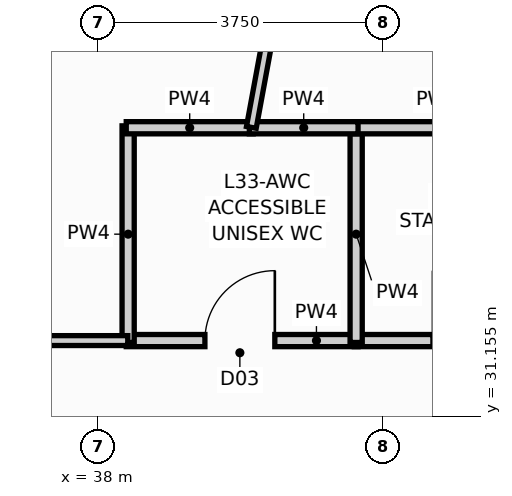
"""IFC4 building model, lengths in metres.
Left out: names, types, materials, properties, quantities, classifications, styles, units other than length and angle.
Written with IfcOpenShell. Run it as: python <this file> out.ifc"""

import sys

from ifc_helpers import new_model, si_unit, direction, frame, frame_2d, origin, place, context, subcontext, project, spatial, rectangle, extrude, element, fill, save


model = new_model("IFC4")
c1 = context("Model", 3, precision=1e-05, world=origin(), true_north=direction((0.0, 1.0)))
c2 = subcontext(c1, "Body", "Model", "MODEL_VIEW")
j1 = project(units=[si_unit("LENGTHUNIT", "METRE"), si_unit("PLANEANGLEUNIT", "RADIAN")], contexts=[c1])
p1 = place(None, origin())
s1 = spatial("IfcSite", under=j1, at=p1, CompositionType="ELEMENT")
p2 = place(p1, origin())
s2 = spatial("IfcBuilding", under=s1, at=p2, CompositionType="ELEMENT")
p3 = place(p2, frame((0.0, 0.0, 127.3)))
s3 = spatial("IfcBuildingStorey", under=s2, at=p3, CompositionType="ELEMENT", Elevation=127.3)
p4 = place(p3, frame((38.375, 32.15, 0.0), z_axis=(0.0, 0.0, 1.0), x_axis=(1.0, 0.0, 0.0)))
e1 = element("IfcWall", 1, at=p4, inside=s3, PredefinedType="PLUMBINGWALL", context=c2, shape_type="SweptSolid", body=[
    extrude(rectangle(XDim=3.05, YDim=0.16, at=frame_2d((1.525, 0.0))), origin(), (0.0, 0.0, 1.0), 3.928),
])
p5 = place(p4, frame((1.035, 0.0, 0.0)))
e2 = element("IfcOpeningElement", 2, at=p5, cuts=e1, PredefinedType="OPENING", context=c2, shape_type="SweptSolid", body=[
    extrude(rectangle(XDim=0.92, YDim=2.1, at=frame_2d((0.46, 1.05))), frame((0.0, 0.092, 0.0), z_axis=(0.0, -1.0, 0.0), x_axis=(1.0, 0.0, 0.0)), (0.0, 0.0, 1.0), 0.184),
])
p6 = place(p3, frame((41.375, 32.15, 0.0), z_axis=(0.0, 0.0, 1.0), x_axis=(1.0, 0.0, 0.0)))
e3 = element("IfcWall", 3, at=p6, inside=s3, PredefinedType="PLUMBINGWALL", context=c2, shape_type="SweptSolid", body=[
    extrude(rectangle(XDim=3.05, YDim=0.16, at=frame_2d((1.525, 0.0))), origin(), (0.0, 0.0, 1.0), 3.928),
])
p7 = place(p6, frame((1.035, 0.0, 0.0)))
e4 = element("IfcOpeningElement", 4, at=p7, cuts=e3, PredefinedType="OPENING", context=c2, shape_type="SweptSolid", body=[
    extrude(rectangle(XDim=0.92, YDim=2.1, at=frame_2d((0.46, 1.05))), frame((0.0, 0.092, 0.0), z_axis=(0.0, -1.0, 0.0), x_axis=(1.0, 0.0, 0.0)), (0.0, 0.0, 1.0), 0.184),
])
for number, where, z_axis, x_axis in (
    (5, (41.4, 32.125, 0.0), (0.0, 0.0, 1.0), (0.0, 1.0, 0.0)),
    (6, (38.4, 32.125, 0.0), (0.0, 0.0, 1.0), (0.0, 1.0, 0.0)),
):
    element("IfcWall", number, at=place(p3, frame(where, z_axis=z_axis, x_axis=x_axis)), inside=s3, PredefinedType="PLUMBINGWALL", context=c2, shape_type="SweptSolid", body=[
        extrude(rectangle(XDim=2.85, YDim=0.16, at=frame_2d((1.425, 0.0))), origin(), (0.0, 0.0, 1.0), 4.25),
    ])
p8 = place(p3, frame((41.375, 34.95, 0.0), z_axis=(0.0, 0.0, 1.0), x_axis=(1.0, 0.0, 0.0)))
e7 = element("IfcWall", 7, at=p8, inside=s3, PredefinedType="PLUMBINGWALL", context=c2, shape_type="SweptSolid", body=[
    extrude(rectangle(XDim=2.19, YDim=0.16, at=frame_2d((1.095, 0.0))), origin(), (0.0, 0.0, 1.0), 3.928),
])
p9 = place(p3, frame((38.375, 34.95, 0.0), z_axis=(0.0, 0.0, 1.0), x_axis=(1.0, 0.0, 0.0)))
e8 = element("IfcWall", 8, at=p9, inside=s3, PredefinedType="PLUMBINGWALL", context=c2, shape_type="SweptSolid", body=[
    extrude(rectangle(XDim=1.67, YDim=0.16, at=frame_2d((0.835, 0.0))), origin(), (0.0, 0.0, 1.0), 3.928),
])
p10 = place(p3, frame((39.995, 34.95, 0.0), z_axis=(0.0, 0.0, 1.0), x_axis=(1.0, 0.0, 0.0)))
e9 = element("IfcWall", 9, at=p10, inside=s3, PredefinedType="PLUMBINGWALL", context=c2, shape_type="SweptSolid", body=[
    extrude(rectangle(XDim=1.43, YDim=0.16, at=frame_2d((0.715, 0.0))), origin(), (0.0, 0.0, 1.0), 3.928),
])
p11 = place(p3, frame((40.021, 34.955, 0.0), z_axis=(0.0, 0.0, 1.0), x_axis=(0.181390390279, 0.983411168492, 0.0)))
e10 = element("IfcWall", 10, at=p11, inside=s3, PredefinedType="PARTITIONING", context=c2, shape_type="SweptSolid", body=[
    extrude(rectangle(XDim=16.764, YDim=0.13, at=frame_2d((8.382, 0.0))), origin(), (0.0, 0.0, 1.0), 4.25),
])
p12 = place(p3, frame((37.165, 32.15, 0.0), z_axis=(0.0, 0.0, 1.0), x_axis=(1.0, 0.0, 0.0)))
e11 = element("IfcWall", 11, at=p12, inside=s3, PredefinedType="PARTITIONING", context=c2, shape_type="SweptSolid", body=[
    extrude(rectangle(XDim=1.23, YDim=0.13, at=frame_2d((0.615, 0.0))), origin(), (0.0, 0.0, 1.0), 3.928),
])
p13 = place(p5, origin())
e12 = element("IfcDoor", 12, at=p13, inside=s3, OperationType="SINGLE_SWING_RIGHT", PredefinedType="DOOR", context=c2, shape_type="SweptSolid", body=[
    extrude(rectangle(XDim=0.92, YDim=2.1, at=frame_2d((0.46, 1.05))), frame((0.0, 0.025, 0.0), z_axis=(0.0, -1.0, 0.0), x_axis=(1.0, 0.0, 0.0)), (0.0, 0.0, 1.0), 0.05),
])
fill(e2, e12)
save(model, sys.argv[1])
